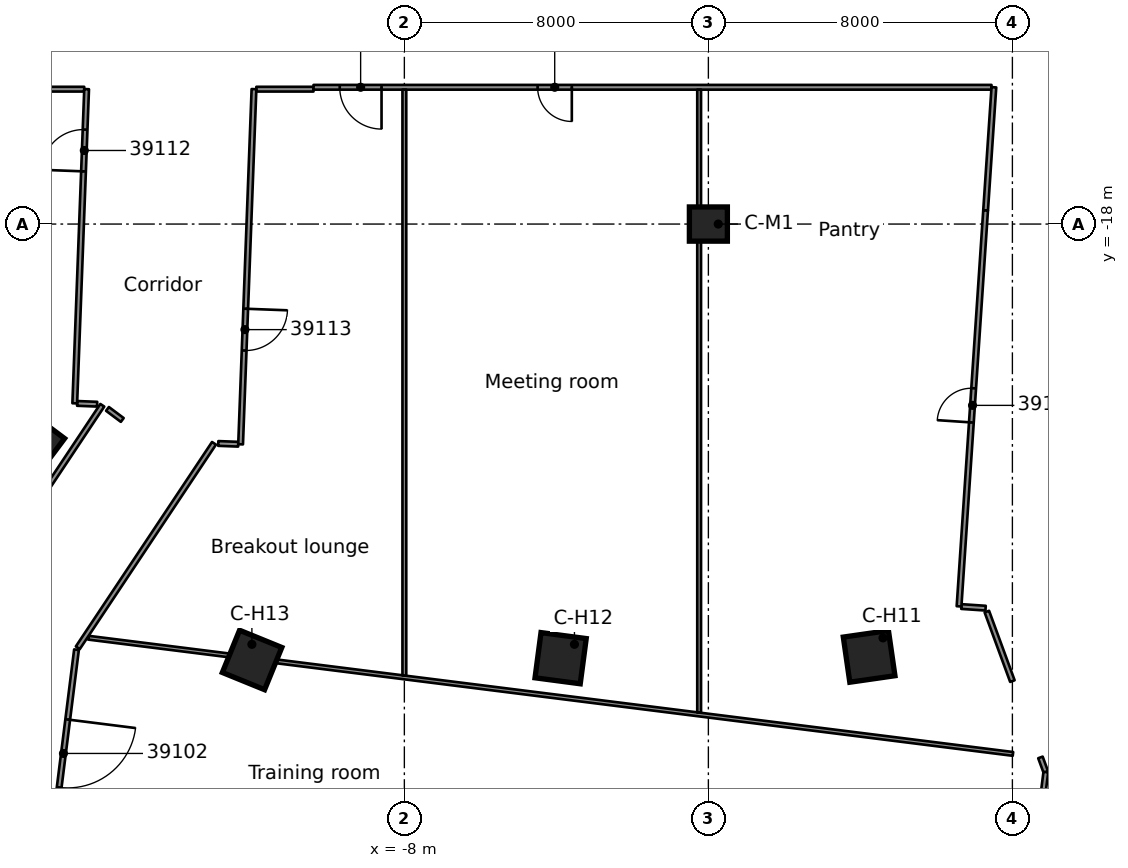
"""IFC4 building model, lengths in metres.
Left out: names, types, materials, properties, quantities, classifications, styles, units other than length and angle.
Written with IfcOpenShell. Run it as: python <this file> out.ifc"""

import sys

from ifc_helpers import new_model, si_unit, direction, frame, frame_2d, origin, origin_2d, place, context, subcontext, project, spatial, rectangle, extrude, element, fill, save


model = new_model("IFC4")
c1 = context("Model", 3, precision=1e-05, world=origin(), true_north=direction((0.0, 1.0)))
c2 = subcontext(c1, "Body", "Model", "MODEL_VIEW")
j1 = project(units=[si_unit("LENGTHUNIT", "METRE"), si_unit("PLANEANGLEUNIT", "RADIAN")], contexts=[c1])
p1 = place(None, origin())
s1 = spatial("IfcSite", under=j1, at=p1, CompositionType="ELEMENT")
p2 = place(p1, origin())
s2 = spatial("IfcBuilding", under=s1, at=p2, CompositionType="ELEMENT")
p3 = place(p2, frame((0.0, 0.0, 192.1)))
s3 = spatial("IfcBuildingStorey", under=s2, at=p3, CompositionType="ELEMENT", Elevation=192.1)
for number, where, z_axis, x_axis in (
    (1, (4.23, -29.376, 0.0), (0.0, 0.0, 1.0), (0.143, -0.99, 0.0)),
    (2, (-3.888, -29.423, 0.0), (0.0, 0.0, 1.0), (-0.131, -0.991, 0.0)),
    (3, (-12.007, -29.47, 0.0), (0.0, 0.0, 1.0), (-0.377, -0.926, 0.0)),
    (4, (-17.781, -23.763, 0.0), (0.0, 0.0, 1.0), (-0.599, -0.801, 0.0)),
):
    element("IfcColumn", number, at=place(p3, frame(where, z_axis=z_axis, x_axis=x_axis)), inside=s3, PredefinedType="COLUMN", context=c2, shape_type="SweptSolid", body=[
        extrude(rectangle(XDim=1.2, YDim=1.2, at=origin_2d()), origin(), (0.0, 0.0, 1.0), 3.5),
    ])
p4 = place(p3, frame((0.0, -18.0, 0.0), z_axis=(0.0, 0.0, 1.0), x_axis=(1.0, 0.0, 0.0)))
e5 = element("IfcColumn", 5, at=p4, inside=s3, PredefinedType="COLUMN", context=c2, shape_type="SweptSolid", body=[
    extrude(rectangle(XDim=1.0, YDim=0.9, at=origin_2d()), origin(), (0.0, 0.0, 1.0), 3.5),
])
p5 = place(p3, frame((7.328, -28.197, 0.0), z_axis=(0.0, 0.0, 1.0), x_axis=(0.34495039198, -0.938620917662, 0.0)))
e6 = element("IfcWall", 6, at=p5, inside=s3, PredefinedType="PARTITIONING", context=c2, shape_type="SweptSolid", body=[
    extrude(rectangle(XDim=1.948, YDim=0.125, at=frame_2d((0.974, 0.0))), origin(), (0.0, 0.0, 1.0), 3.06),
])
p6 = place(p3, frame((8.738, -32.034, 0.0), z_axis=(0.0, 0.0, 1.0), x_axis=(0.344934891115, -0.938626614204, 0.0)))
e7 = element("IfcWall", 7, at=p6, inside=s3, PredefinedType="PARTITIONING", context=c2, shape_type="SweptSolid", body=[
    extrude(rectangle(XDim=0.411, YDim=0.125, at=frame_2d((0.206, 0.0))), origin(), (0.0, 0.0, 1.0), 3.06),
])
p7 = place(p3, frame((-15.812, -22.864, 0.0), z_axis=(0.0, 0.0, 1.0), x_axis=(0.800662960461, -0.599115033817, 0.0)))
e8 = element("IfcWall", 8, at=p7, inside=s3, PredefinedType="PARTITIONING", context=c2, shape_type="SweptSolid", body=[
    extrude(rectangle(XDim=0.486, YDim=0.125, at=frame_2d((0.243, 0.0))), origin(), (0.0, 0.0, 1.0), 3.06),
])
p8 = place(p3, frame((-16.315, -28.884, 0.0), z_axis=(0.0, 0.0, 1.0), x_axis=(0.992194172305, -0.124702543857, 0.0)))
e9 = element("IfcWall", 9, at=p8, inside=s3, PredefinedType="PARTITIONING", context=c2, shape_type="SweptSolid", body=[
    extrude(rectangle(XDim=24.521, YDim=0.1, at=frame_2d((12.261, 0.0))), origin(), (0.0, 0.0, 1.0), 3.06),
])
p9 = place(p3, frame((6.658, -28.064, 0.0), z_axis=(0.0, 0.0, 1.0), x_axis=(0.997732391846, -0.067305826357, 0.0)))
e10 = element("IfcWall", 10, at=p9, inside=s3, PredefinedType="PARTITIONING", context=c2, shape_type="SweptSolid", body=[
    extrude(rectangle(XDim=0.638, YDim=0.125, at=frame_2d((0.319, 0.0))), origin(), (0.0, 0.0, 1.0), 3.06),
])
p10 = place(p3, frame((-16.61, -22.719, 0.0), z_axis=(0.0, 0.0, 1.0), x_axis=(0.999204657851, -0.039875452703, 0.0)))
e11 = element("IfcWall", 11, at=p10, inside=s3, PredefinedType="PARTITIONING", context=c2, shape_type="SweptSolid", body=[
    extrude(rectangle(XDim=0.527, YDim=0.125, at=frame_2d((0.263, 0.0))), origin(), (0.0, 0.0, 1.0), 3.06),
])
p11 = place(p3, frame((-12.897, -23.773, 0.0), z_axis=(0.0, 0.0, 1.0), x_axis=(0.99927617333, -0.038041154231, 0.0)))
e12 = element("IfcWall", 12, at=p11, inside=s3, PredefinedType="PARTITIONING", context=c2, shape_type="SweptSolid", body=[
    extrude(rectangle(XDim=0.526, YDim=0.125, at=frame_2d((0.263, 0.0))), origin(), (0.0, 0.0, 1.0), 3.06),
])
p12 = place(p3, frame((-21.387, -14.451, 0.0), z_axis=(0.0, 0.0, 1.0), x_axis=(1.0, 0.0, 0.0)))
e13 = element("IfcWall", 13, at=p12, inside=s3, PredefinedType="PARTITIONING", context=c2, shape_type="SweptSolid", body=[
    extrude(rectangle(XDim=4.963, YDim=0.125, at=frame_2d((2.481, 0.0))), origin(), (0.0, 0.0, 1.0), 3.06),
])
p13 = place(p3, frame((-11.895, -14.451, 0.0), z_axis=(0.0, 0.0, 1.0), x_axis=(1.0, 0.0, 0.0)))
e14 = element("IfcWall", 14, at=p13, inside=s3, PredefinedType="PARTITIONING", context=c2, shape_type="SweptSolid", body=[
    extrude(rectangle(XDim=1.504, YDim=0.125, at=frame_2d((0.752, 0.0))), origin(), (0.0, 0.0, 1.0), 3.06),
])
p14 = place(p3, frame((7.45, -14.401, 0.0), z_axis=(0.0, 0.0, 1.0), x_axis=(-1.0, 0.0, 0.0)))
e15 = element("IfcWall", 15, at=p14, inside=s3, PredefinedType="PARTITIONING", context=c2, shape_type="SweptSolid", body=[
    extrude(rectangle(XDim=17.84, YDim=0.125, at=frame_2d((8.92, 0.0))), origin(), (0.0, 0.0, 1.0), 3.06),
])
p15 = place(p14, frame((16.051, 0.0, 0.0)))
e16 = element("IfcOpeningElement", 16, at=p15, cuts=e15, PredefinedType="OPENING", context=c2, shape_type="SweptSolid", body=[
    extrude(rectangle(XDim=1.1, YDim=2.1, at=frame_2d((0.55, 1.05))), frame((0.0, 0.073, 0.0), z_axis=(0.0, -1.0, 0.0), x_axis=(1.0, 0.0, 0.0)), (0.0, 0.0, 1.0), 0.145),
])
p16 = place(p14, frame((11.043, 0.0, 0.0)))
e17 = element("IfcOpeningElement", 17, at=p16, cuts=e15, PredefinedType="OPENING", context=c2, shape_type="SweptSolid", body=[
    extrude(rectangle(XDim=0.9, YDim=2.1, at=frame_2d((0.45, 1.05))), frame((0.0, 0.073, 0.0), z_axis=(0.0, -1.0, 0.0), x_axis=(1.0, 0.0, 0.0)), (0.0, 0.0, 1.0), 0.145),
])
p17 = place(p3, frame((-13.009, -23.769, 0.0), z_axis=(0.0, 0.0, 1.0), x_axis=(-0.554421269435, -0.832236178016, 0.0)))
e18 = element("IfcWall", 18, at=p17, inside=s3, PredefinedType="PARTITIONING", context=c2, shape_type="SweptSolid", body=[
    extrude(rectangle(XDim=6.464, YDim=0.125, at=frame_2d((3.232, 0.0))), origin(), (0.0, 0.0, 1.0), 3.06),
])
p18 = place(p3, frame((-15.948, -22.768, 0.0), z_axis=(0.0, 0.0, 1.0), x_axis=(-0.554404200785, -0.832247548601, 0.0)))
e19 = element("IfcWall", 19, at=p18, inside=s3, PredefinedType="PARTITIONING", context=c2, shape_type="SweptSolid", body=[
    extrude(rectangle(XDim=5.33, YDim=0.125, at=frame_2d((2.665, 0.0))), origin(), (0.0, 0.0, 1.0), 3.06),
])
p19 = place(p3, frame((7.416, -44.066, 0.0), z_axis=(0.0, 0.0, 1.0), x_axis=(0.124705364761, 0.992193817759, 0.0)))
e20 = element("IfcWall", 20, at=p19, inside=s3, PredefinedType="PARTITIONING", context=c2, shape_type="SweptSolid", body=[
    extrude(rectangle(XDim=11.739, YDim=0.125, at=frame_2d((5.869, 0.0))), origin(), (0.0, 0.0, 1.0), 3.06),
])
p20 = place(p19, frame((8.097, 0.0, 0.0)))
e21 = element("IfcOpeningElement", 21, at=p20, cuts=e20, PredefinedType="OPENING", context=c2, shape_type="SweptSolid", body=[
    extrude(rectangle(XDim=1.8, YDim=2.1, at=frame_2d((0.9, 1.05))), frame((0.0, 0.073, 0.0), z_axis=(0.0, -1.0, 0.0), x_axis=(1.0, 0.0, 0.0)), (0.0, 0.0, 1.0), 0.145),
])
p21 = place(p19, frame((2.85, 0.0, 0.0)))
e22 = element("IfcOpeningElement", 22, at=p21, cuts=e20, PredefinedType="OPENING", context=c2, shape_type="SweptSolid", body=[
    extrude(rectangle(XDim=0.9, YDim=2.1, at=frame_2d((0.45, 1.05))), frame((0.0, 0.073, 0.0), z_axis=(0.0, -1.0, 0.0), x_axis=(1.0, 0.0, 0.0)), (0.0, 0.0, 1.0), 0.145),
])
p22 = place(p3, frame((-16.627, -29.199, 0.0), z_axis=(0.0, 0.0, 1.0), x_axis=(-0.124845291818, -0.992176220795, 0.0)))
e23 = element("IfcWall", 23, at=p22, inside=s3, PredefinedType="PARTITIONING", context=c2, shape_type="SweptSolid", body=[
    extrude(rectangle(XDim=11.751, YDim=0.125, at=frame_2d((5.875, 0.0))), origin(), (0.0, 0.0, 1.0), 3.06),
])
p23 = place(p22, frame((1.852, 0.0, 0.0)))
e24 = element("IfcOpeningElement", 24, at=p23, cuts=e23, PredefinedType="OPENING", context=c2, shape_type="SweptSolid", body=[
    extrude(rectangle(XDim=1.8, YDim=2.1, at=frame_2d((0.9, 1.05))), frame((0.0, 0.073, 0.0), z_axis=(0.0, -1.0, 0.0), x_axis=(1.0, 0.0, 0.0)), (0.0, 0.0, 1.0), 0.145),
])
p24 = place(p3, frame((7.295, -17.642, 0.0), z_axis=(0.0, 0.0, 1.0), x_axis=(0.067112582875, 0.99774540902, 0.0)))
e25 = element("IfcWall", 25, at=p24, inside=s3, PredefinedType="PARTITIONING", context=c2, shape_type="SweptSolid", body=[
    extrude(rectangle(XDim=3.249, YDim=0.125, at=frame_2d((1.624, 0.0))), origin(), (0.0, 0.0, 1.0), 3.06),
])
p25 = place(p3, frame((6.596, -28.059, 0.0), z_axis=(0.0, 0.0, 1.0), x_axis=(0.066948921555, 0.99775640409, 0.0)))
e26 = element("IfcWall", 26, at=p25, inside=s3, PredefinedType="PARTITIONING", context=c2, shape_type="SweptSolid", body=[
    extrude(rectangle(XDim=10.44, YDim=0.125, at=frame_2d((5.22, 0.0))), origin(), (0.0, 0.0, 1.0), 3.06),
])
p26 = place(p25, frame((4.85, 0.0, 0.0)))
e27 = element("IfcOpeningElement", 27, at=p26, cuts=e26, PredefinedType="OPENING", context=c2, shape_type="SweptSolid", body=[
    extrude(rectangle(XDim=0.9, YDim=2.1, at=frame_2d((0.45, 1.05))), frame((0.0, 0.073, 0.0), z_axis=(0.0, -1.0, 0.0), x_axis=(1.0, 0.0, 0.0)), (0.0, 0.0, 1.0), 0.145),
])
p27 = place(p3, frame((-11.957, -14.45, 0.0), z_axis=(0.0, 0.0, 1.0), x_axis=(-0.037646049024, -0.999291136253, 0.0)))
e28 = element("IfcWall", 28, at=p27, inside=s3, PredefinedType="PARTITIONING", context=c2, shape_type="SweptSolid", body=[
    extrude(rectangle(XDim=9.352, YDim=0.125, at=frame_2d((4.676, 0.0))), origin(), (0.0, 0.0, 1.0), 3.06),
])
p28 = place(p27, frame((5.782, 0.0, 0.0)))
e29 = element("IfcOpeningElement", 29, at=p28, cuts=e28, PredefinedType="OPENING", context=c2, shape_type="SweptSolid", body=[
    extrude(rectangle(XDim=1.1, YDim=2.1, at=frame_2d((0.55, 1.05))), frame((0.0, 0.073, 0.0), z_axis=(0.0, -1.0, 0.0), x_axis=(1.0, 0.0, 0.0)), (0.0, 0.0, 1.0), 0.145),
])
p29 = place(p3, frame((-16.673, -22.717, 0.0), z_axis=(0.0, 0.0, 1.0), x_axis=(0.037714570023, 0.999288552525, 0.0)))
e30 = element("IfcWall", 30, at=p29, inside=s3, PredefinedType="PARTITIONING", context=c2, shape_type="SweptSolid", body=[
    extrude(rectangle(XDim=8.273, YDim=0.125, at=frame_2d((4.136, 0.0))), origin(), (0.0, 0.0, 1.0), 3.06),
])
p30 = place(p29, frame((6.108, 0.0, 0.0)))
e31 = element("IfcOpeningElement", 31, at=p30, cuts=e30, PredefinedType="OPENING", context=c2, shape_type="SweptSolid", body=[
    extrude(rectangle(XDim=1.1, YDim=2.1, at=frame_2d((0.55, 1.05))), frame((0.0, 0.073, 0.0), z_axis=(0.0, -1.0, 0.0), x_axis=(1.0, 0.0, 0.0)), (0.0, 0.0, 1.0), 0.145),
])
p31 = place(p3, frame((-0.243, -30.854, 0.0), z_axis=(0.0, 0.0, 1.0), x_axis=(0.0, 1.0, 0.0)))
e32 = element("IfcWall", 32, at=p31, inside=s3, PredefinedType="PARTITIONING", context=c2, shape_type="SweptSolid", body=[
    extrude(rectangle(XDim=16.391, YDim=0.1, at=frame_2d((8.196, 0.0))), origin(), (0.0, 0.0, 1.0), 3.06),
])
p32 = place(p3, frame((-8.0, -29.879, 0.0), z_axis=(0.0, 0.0, 1.0), x_axis=(0.0, 1.0, 0.0)))
e33 = element("IfcWall", 33, at=p32, inside=s3, PredefinedType="PARTITIONING", context=c2, shape_type="SweptSolid", body=[
    extrude(rectangle(XDim=15.416, YDim=0.1, at=frame_2d((7.708, 0.0))), origin(), (0.0, 0.0, 1.0), 3.06),
])
p33 = place(p23, origin())
e34 = element("IfcDoor", 34, at=p33, inside=s3, OperationType="DOUBLE_DOOR_SINGLE_SWING", PredefinedType="DOOR", context=c2, shape_type="SweptSolid", body=[
    extrude(rectangle(XDim=1.8, YDim=2.1, at=frame_2d((0.9, 1.05))), frame((0.0, 0.025, 0.0), z_axis=(0.0, -1.0, 0.0), x_axis=(1.0, 0.0, 0.0)), (0.0, 0.0, 1.0), 0.05),
])
fill(e24, e34)
p34 = place(p30, origin())
e35 = element("IfcDoor", 35, at=p34, inside=s3, OperationType="SINGLE_SWING_RIGHT", PredefinedType="DOOR", context=c2, shape_type="SweptSolid", body=[
    extrude(rectangle(XDim=1.1, YDim=2.1, at=frame_2d((0.55, 1.05))), frame((0.0, 0.025, 0.0), z_axis=(0.0, -1.0, 0.0), x_axis=(1.0, 0.0, 0.0)), (0.0, 0.0, 1.0), 0.05),
])
fill(e31, e35)
p35 = place(p28, origin())
e36 = element("IfcDoor", 36, at=p35, inside=s3, OperationType="SINGLE_SWING_RIGHT", PredefinedType="DOOR", context=c2, shape_type="SweptSolid", body=[
    extrude(rectangle(XDim=1.1, YDim=2.1, at=frame_2d((0.55, 1.05))), frame((0.0, 0.025, 0.0), z_axis=(0.0, -1.0, 0.0), x_axis=(1.0, 0.0, 0.0)), (0.0, 0.0, 1.0), 0.05),
])
fill(e29, e36)
p36 = place(p15, origin())
e37 = element("IfcDoor", 37, at=p36, inside=s3, OperationType="SINGLE_SWING_RIGHT", PredefinedType="DOOR", context=c2, shape_type="SweptSolid", body=[
    extrude(rectangle(XDim=1.1, YDim=2.1, at=frame_2d((0.55, 1.05))), frame((0.0, 0.025, 0.0), z_axis=(0.0, -1.0, 0.0), x_axis=(1.0, 0.0, 0.0)), (0.0, 0.0, 1.0), 0.05),
])
fill(e16, e37)
p37 = place(p16, origin())
e38 = element("IfcDoor", 38, at=p37, inside=s3, OperationType="SINGLE_SWING_RIGHT", PredefinedType="DOOR", context=c2, shape_type="SweptSolid", body=[
    extrude(rectangle(XDim=0.9, YDim=2.1, at=frame_2d((0.45, 1.05))), frame((0.0, 0.025, 0.0), z_axis=(0.0, -1.0, 0.0), x_axis=(1.0, 0.0, 0.0)), (0.0, 0.0, 1.0), 0.05),
])
fill(e17, e38)
p38 = place(p26, origin())
e39 = element("IfcDoor", 39, at=p38, inside=s3, OperationType="SINGLE_SWING_RIGHT", PredefinedType="DOOR", context=c2, shape_type="SweptSolid", body=[
    extrude(rectangle(XDim=0.9, YDim=2.1, at=frame_2d((0.45, 1.05))), frame((0.0, 0.025, 0.0), z_axis=(0.0, -1.0, 0.0), x_axis=(1.0, 0.0, 0.0)), (0.0, 0.0, 1.0), 0.05),
])
fill(e27, e39)
save(model, sys.argv[1])
